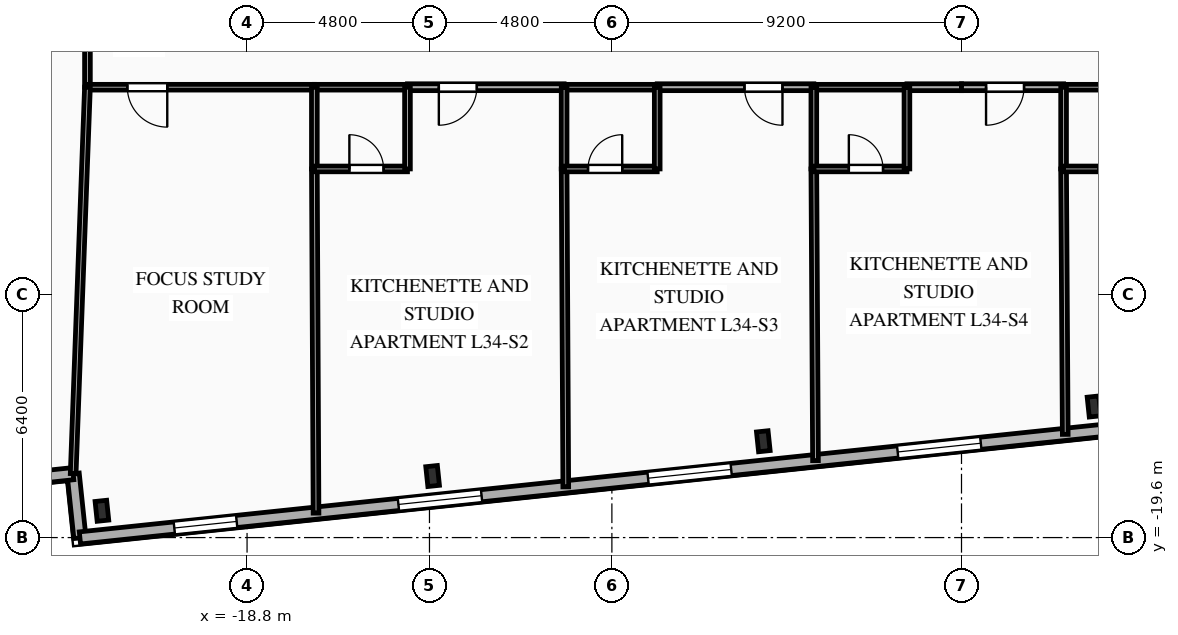
"""IFC4 building model, lengths in metres.
Left out: names, types, materials, properties, quantities, classifications, styles, units other than length and angle.
Written with IfcOpenShell. Run it as: python <this file> out.ifc"""

import sys

from ifc_helpers import new_model, si_unit, direction, frame, frame_2d, origin, origin_2d, place, context, subcontext, project, spatial, rectangle, i_section, extrude, element, fill, save


model = new_model("IFC4")
c1 = context("Model", 3, precision=1e-05, world=origin(), true_north=direction((0.0, 1.0)))
c2 = subcontext(c1, "Body", "Model", "MODEL_VIEW")
j1 = project(units=[si_unit("LENGTHUNIT", "METRE"), si_unit("PLANEANGLEUNIT", "RADIAN")], contexts=[c1])
p1 = place(None, origin())
s1 = spatial("IfcSite", under=j1, at=p1, CompositionType="ELEMENT")
p2 = place(p1, origin())
s2 = spatial("IfcBuilding", under=s1, at=p2, CompositionType="ELEMENT")
p3 = place(p2, frame((0.0, 0.0, 122.55)))
s3 = spatial("IfcBuildingStorey", under=s2, at=p3, CompositionType="ELEMENT", Elevation=122.55)
for number, where, z_axis, x_axis in (
    (1, (-22.619, -18.895, 0.0), (0.0, 0.0, 1.0), (0.995, 0.105, 0.0)),
    (2, (-13.917, -17.98, 0.0), (0.0, 0.0, 1.0), (0.995, 0.105, 0.0)),
    (3, (-5.215, -17.066, 0.0), (0.0, 0.0, 1.0), (0.995, 0.105, 0.0)),
    (4, (3.487, -16.151, 0.0), (0.0, 0.0, 1.0), (0.995, 0.105, 0.0)),
):
    element("IfcColumn", number, at=place(p3, frame(where, z_axis=z_axis, x_axis=x_axis)), inside=s3, PredefinedType="COLUMN", context=c2, shape_type="SweptSolid", body=[
        extrude(i_section(OverallWidth=0.306, OverallDepth=0.524, WebThickness=0.021, FlangeThickness=0.04, FilletRadius=0.027, at=origin_2d()), origin(), (0.0, 0.0, 1.0), 3.35),
    ])
for number, where, z_axis, x_axis in (
    (5, (-23.198, -19.609, 0.0), (0.0, 0.0, 1.0), (-0.105, 0.995, 0.0)),
    (6, (-23.376, -17.919, 0.0), (0.0, 0.0, 1.0), (-0.995, -0.105, 0.0)),
):
    element("IfcWall", number, at=place(p3, frame(where, z_axis=z_axis, x_axis=x_axis)), inside=s3, PredefinedType="SOLIDWALL", context=c2, shape_type="SweptSolid", body=[
        extrude(rectangle(XDim=1.7, YDim=0.32, at=frame_2d((0.85, 0.0))), origin(), (0.0, 0.0, 1.0), 3.0),
    ])
p4 = place(p3, frame((30.307, -13.986, 0.0), z_axis=(0.0, 0.0, 1.0), x_axis=(-0.994521628355, -0.104531003701, 0.0)))
e7 = element("IfcWall", 7, at=p4, inside=s3, PredefinedType="SOLIDWALL", context=c2, shape_type="SweptSolid", body=[
    extrude(rectangle(XDim=53.8, YDim=0.32, at=frame_2d((26.9, 0.0))), origin(), (0.0, 0.0, 1.0), 3.0),
])
p5 = place(p4, frame((3.098, 0.0, 0.85)))
e8 = element("IfcOpeningElement", 8, at=p5, cuts=e7, PredefinedType="OPENING", context=c2, shape_type="SweptSolid", body=[
    extrude(rectangle(XDim=1.65, YDim=1.85, at=frame_2d((0.825, 0.925))), frame((0.0, 0.17, 0.0), z_axis=(0.0, -1.0, 0.0), x_axis=(1.0, 0.0, 0.0)), (0.0, 0.0, 1.0), 0.34),
])
p6 = place(p4, frame((10.143, 0.0, 0.85)))
e9 = element("IfcOpeningElement", 9, at=p6, cuts=e7, PredefinedType="OPENING", context=c2, shape_type="SweptSolid", body=[
    extrude(rectangle(XDim=1.65, YDim=1.85, at=frame_2d((0.825, 0.925))), frame((0.0, 0.17, 0.0), z_axis=(0.0, -1.0, 0.0), x_axis=(1.0, 0.0, 0.0)), (0.0, 0.0, 1.0), 0.34),
])
p7 = place(p4, frame((16.753, 0.0, 0.85)))
e10 = element("IfcOpeningElement", 10, at=p7, cuts=e7, PredefinedType="OPENING", context=c2, shape_type="SweptSolid", body=[
    extrude(rectangle(XDim=2.2, YDim=1.85, at=frame_2d((1.1, 0.925))), frame((0.0, 0.17, 0.0), z_axis=(0.0, -1.0, 0.0), x_axis=(1.0, 0.0, 0.0)), (0.0, 0.0, 1.0), 0.34),
])
p8 = place(p4, frame((23.358, 0.0, 0.85)))
e11 = element("IfcOpeningElement", 11, at=p8, cuts=e7, PredefinedType="OPENING", context=c2, shape_type="SweptSolid", body=[
    extrude(rectangle(XDim=2.2, YDim=1.85, at=frame_2d((1.1, 0.925))), frame((0.0, 0.17, 0.0), z_axis=(0.0, -1.0, 0.0), x_axis=(1.0, 0.0, 0.0)), (0.0, 0.0, 1.0), 0.34),
])
p9 = place(p4, frame((29.963, 0.0, 0.85)))
e12 = element("IfcOpeningElement", 12, at=p9, cuts=e7, PredefinedType="OPENING", context=c2, shape_type="SweptSolid", body=[
    extrude(rectangle(XDim=2.2, YDim=1.85, at=frame_2d((1.1, 0.925))), frame((0.0, 0.17, 0.0), z_axis=(0.0, -1.0, 0.0), x_axis=(1.0, 0.0, 0.0)), (0.0, 0.0, 1.0), 0.34),
])
p10 = place(p4, frame((36.568, 0.0, 0.85)))
e13 = element("IfcOpeningElement", 13, at=p10, cuts=e7, PredefinedType="OPENING", context=c2, shape_type="SweptSolid", body=[
    extrude(rectangle(XDim=2.2, YDim=1.85, at=frame_2d((1.1, 0.925))), frame((0.0, 0.17, 0.0), z_axis=(0.0, -1.0, 0.0), x_axis=(1.0, 0.0, 0.0)), (0.0, 0.0, 1.0), 0.34),
])
p11 = place(p4, frame((43.173, 0.0, 0.85)))
e14 = element("IfcOpeningElement", 14, at=p11, cuts=e7, PredefinedType="OPENING", context=c2, shape_type="SweptSolid", body=[
    extrude(rectangle(XDim=2.2, YDim=1.85, at=frame_2d((1.1, 0.925))), frame((0.0, 0.17, 0.0), z_axis=(0.0, -1.0, 0.0), x_axis=(1.0, 0.0, 0.0)), (0.0, 0.0, 1.0), 0.34),
])
p12 = place(p4, frame((49.653, 0.0, 0.85)))
e15 = element("IfcOpeningElement", 15, at=p12, cuts=e7, PredefinedType="OPENING", context=c2, shape_type="SweptSolid", body=[
    extrude(rectangle(XDim=1.65, YDim=1.85, at=frame_2d((0.825, 0.925))), frame((0.0, 0.17, 0.0), z_axis=(0.0, -1.0, 0.0), x_axis=(1.0, 0.0, 0.0)), (0.0, 0.0, 1.0), 0.34),
])
p13 = place(p3, frame((-23.0, -7.75, 0.0), z_axis=(0.0, 0.0, 1.0), x_axis=(0.0, 1.0, 0.0)))
e16 = element("IfcWall", 16, at=p13, inside=s3, PredefinedType="PARTITIONING", context=c2, shape_type="SweptSolid", body=[
    extrude(rectangle(XDim=2.15, YDim=0.15, at=frame_2d((1.075, 0.0))), origin(), (0.0, 0.0, 1.0), 2.655),
])
p14 = place(p3, frame((-17.029, -7.75, 0.0), z_axis=(0.0, 0.0, 1.0), x_axis=(-1.0, 0.0, 0.0)))
e17 = element("IfcWall", 17, at=p14, inside=s3, PredefinedType="PARTITIONING", context=c2, shape_type="SweptSolid", body=[
    extrude(rectangle(XDim=5.971, YDim=0.15, at=frame_2d((2.985, 0.0))), origin(), (0.0, 0.0, 1.0), 3.0),
])
p15 = place(p14, frame((3.871, 0.0, 0.0)))
e18 = element("IfcOpeningElement", 18, at=p15, cuts=e17, PredefinedType="OPENING", context=c2, shape_type="SweptSolid", body=[
    extrude(rectangle(XDim=1.05, YDim=2.15, at=frame_2d((0.525, 1.075))), frame((0.0, 0.085, 0.0), z_axis=(0.0, -1.0, 0.0), x_axis=(1.0, 0.0, 0.0)), (0.0, 0.0, 1.0), 0.17),
])
p16 = place(p3, frame((-10.457, -7.75, 0.0), z_axis=(0.0, 0.0, 1.0), x_axis=(-1.0, 0.0, 0.0)))
e19 = element("IfcWall", 19, at=p16, inside=s3, PredefinedType="PARTITIONING", context=c2, shape_type="SweptSolid", body=[
    extrude(rectangle(XDim=4.122, YDim=0.18, at=frame_2d((2.061, 0.0))), origin(), (0.0, 0.0, 1.0), 3.0),
])
p17 = place(p16, frame((2.297, 0.0, 0.0)))
e20 = element("IfcOpeningElement", 20, at=p17, cuts=e19, PredefinedType="OPENING", context=c2, shape_type="SweptSolid", body=[
    extrude(rectangle(XDim=1.0, YDim=2.15, at=frame_2d((0.5, 1.075))), frame((0.0, 0.1, 0.0), z_axis=(0.0, -1.0, 0.0), x_axis=(1.0, 0.0, 0.0)), (0.0, 0.0, 1.0), 0.2),
])
p18 = place(p3, frame((-14.579, -7.75, 0.0), z_axis=(0.0, 0.0, 1.0), x_axis=(-1.0, 0.0, 0.0)))
e21 = element("IfcWall", 21, at=p18, inside=s3, PredefinedType="PLUMBINGWALL", context=c2, shape_type="SweptSolid", body=[
    extrude(rectangle(XDim=2.45, YDim=0.15, at=frame_2d((1.225, 0.0))), origin(), (0.0, 0.0, 1.0), 3.0),
])
p19 = place(p3, frame((-3.886, -7.75, 0.0), z_axis=(0.0, 0.0, 1.0), x_axis=(-1.0, 0.0, 0.0)))
e22 = element("IfcWall", 22, at=p19, inside=s3, PredefinedType="PARTITIONING", context=c2, shape_type="SweptSolid", body=[
    extrude(rectangle(XDim=4.121, YDim=0.18, at=frame_2d((2.061, 0.0))), origin(), (0.0, 0.0, 1.0), 3.0),
])
p20 = place(p19, frame((0.825, 0.0, 0.0)))
e23 = element("IfcOpeningElement", 23, at=p20, cuts=e22, PredefinedType="OPENING", context=c2, shape_type="SweptSolid", body=[
    extrude(rectangle(XDim=1.0, YDim=2.15, at=frame_2d((0.5, 1.075))), frame((0.0, 0.1, 0.0), z_axis=(0.0, -1.0, 0.0), x_axis=(1.0, 0.0, 0.0)), (0.0, 0.0, 1.0), 0.2),
])
p21 = place(p3, frame((-8.007, -7.75, 0.0), z_axis=(0.0, 0.0, 1.0), x_axis=(-1.0, 0.0, 0.0)))
e24 = element("IfcWall", 24, at=p21, inside=s3, PredefinedType="PLUMBINGWALL", context=c2, shape_type="SweptSolid", body=[
    extrude(rectangle(XDim=2.45, YDim=0.15, at=frame_2d((1.225, 0.0))), origin(), (0.0, 0.0, 1.0), 3.0),
])
p22 = place(p3, frame((0.0, -7.75, 0.0), z_axis=(0.0, 0.0, 1.0), x_axis=(-1.0, 0.0, 0.0)))
e25 = element("IfcWall", 25, at=p22, inside=s3, PredefinedType="PARTITIONING", context=c2, shape_type="SweptSolid", body=[
    extrude(rectangle(XDim=1.436, YDim=0.18, at=frame_2d((0.718, 0.0))), origin(), (0.0, 0.0, 1.0), 3.0),
])
p23 = place(p3, frame((-1.436, -7.75, 0.0), z_axis=(0.0, 0.0, 1.0), x_axis=(-1.0, 0.0, 0.0)))
e26 = element("IfcWall", 26, at=p23, inside=s3, PredefinedType="PLUMBINGWALL", context=c2, shape_type="SweptSolid", body=[
    extrude(rectangle(XDim=2.45, YDim=0.15, at=frame_2d((1.225, 0.0))), origin(), (0.0, 0.0, 1.0), 3.0),
])
p24 = place(p3, frame((2.686, -7.75, 0.0), z_axis=(0.0, 0.0, 1.0), x_axis=(-1.0, 0.0, 0.0)))
e27 = element("IfcWall", 27, at=p24, inside=s3, PredefinedType="PARTITIONING", context=c2, shape_type="SweptSolid", body=[
    extrude(rectangle(XDim=2.686, YDim=0.18, at=frame_2d((1.343, 0.0))), origin(), (0.0, 0.0, 1.0), 3.0),
])
p25 = place(p24, frame((1.04, 0.0, 0.0)))
e28 = element("IfcOpeningElement", 28, at=p25, cuts=e27, PredefinedType="OPENING", context=c2, shape_type="SweptSolid", body=[
    extrude(rectangle(XDim=1.0, YDim=2.15, at=frame_2d((0.5, 1.075))), frame((0.0, 0.1, 0.0), z_axis=(0.0, -1.0, 0.0), x_axis=(1.0, 0.0, 0.0)), (0.0, 0.0, 1.0), 0.2),
])
p26 = place(p3, frame((5.136, -7.75, 0.0), z_axis=(0.0, 0.0, 1.0), x_axis=(-1.0, 0.0, 0.0)))
e29 = element("IfcWall", 29, at=p26, inside=s3, PredefinedType="PLUMBINGWALL", context=c2, shape_type="SweptSolid", body=[
    extrude(rectangle(XDim=2.45, YDim=0.15, at=frame_2d((1.225, 0.0))), origin(), (0.0, 0.0, 1.0), 3.0),
])
p27 = place(p3, frame((-23.0, -7.75, 0.0), z_axis=(0.0, 0.0, 1.0), x_axis=(-0.036924695214, -0.999318050914, 0.0)))
e30 = element("IfcWall", 30, at=p27, inside=s3, PredefinedType="PARTITIONING", context=c2, shape_type="SweptSolid", body=[
    extrude(rectangle(XDim=10.176, YDim=0.15, at=frame_2d((5.088, 0.0))), origin(), (0.0, 0.0, 1.0), 3.0),
])
p28 = place(p3, frame((-17.029, -9.9, 0.0), z_axis=(0.0, 0.0, 1.0), x_axis=(0.004852348859, -0.999988227286, 0.0)))
e31 = element("IfcWall", 31, at=p28, inside=s3, PredefinedType="PARTITIONING", context=c2, shape_type="SweptSolid", body=[
    extrude(rectangle(XDim=9.056, YDim=0.15, at=frame_2d((4.528, 0.0))), origin(), (0.0, 0.0, 1.0), 3.0),
])
p29 = place(p3, frame((-17.029, -7.75, 0.0), z_axis=(0.0, 0.0, 1.0), x_axis=(0.0, -1.0, 0.0)))
e32 = element("IfcWall", 32, at=p29, inside=s3, PredefinedType="PLUMBINGWALL", context=c2, shape_type="SweptSolid", body=[
    extrude(rectangle(XDim=2.15, YDim=0.15, at=frame_2d((1.075, 0.0))), origin(), (0.0, 0.0, 1.0), 3.0),
])
p30 = place(p3, frame((-17.029, -9.9, 0.0), z_axis=(0.0, 0.0, 1.0), x_axis=(1.0, 0.0, 0.0)))
e33 = element("IfcWall", 33, at=p30, inside=s3, PredefinedType="PLUMBINGWALL", context=c2, shape_type="SweptSolid", body=[
    extrude(rectangle(XDim=2.45, YDim=0.15, at=frame_2d((1.225, 0.0))), origin(), (0.0, 0.0, 1.0), 3.0),
])
p31 = place(p30, frame((0.921, 0.0, 0.0)))
e34 = element("IfcOpeningElement", 34, at=p31, cuts=e33, PredefinedType="OPENING", context=c2, shape_type="SweptSolid", body=[
    extrude(rectangle(XDim=0.9, YDim=2.1, at=frame_2d((0.45, 1.05))), frame((0.0, 0.085, 0.0), z_axis=(0.0, -1.0, 0.0), x_axis=(1.0, 0.0, 0.0)), (0.0, 0.0, 1.0), 0.17),
])
p32 = place(p3, frame((-14.579, -9.9, 0.0), z_axis=(0.0, 0.0, 1.0), x_axis=(0.0, 1.0, 0.0)))
e35 = element("IfcWall", 35, at=p32, inside=s3, PredefinedType="PLUMBINGWALL", context=c2, shape_type="SweptSolid", body=[
    extrude(rectangle(XDim=2.15, YDim=0.15, at=frame_2d((1.075, 0.0))), origin(), (0.0, 0.0, 1.0), 3.0),
])
p33 = place(p3, frame((-10.457, -9.9, 0.0), z_axis=(0.0, 0.0, 1.0), x_axis=(0.005252948012, -0.999986203173, 0.0)))
e36 = element("IfcWall", 36, at=p33, inside=s3, PredefinedType="PARTITIONING", context=c2, shape_type="SweptSolid", body=[
    extrude(rectangle(XDim=8.366, YDim=0.15, at=frame_2d((4.183, 0.0))), origin(), (0.0, 0.0, 1.0), 3.0),
])
p34 = place(p3, frame((-10.457, -7.75, 0.0), z_axis=(0.0, 0.0, 1.0), x_axis=(0.0, -1.0, 0.0)))
e37 = element("IfcWall", 37, at=p34, inside=s3, PredefinedType="PLUMBINGWALL", context=c2, shape_type="SweptSolid", body=[
    extrude(rectangle(XDim=2.15, YDim=0.15, at=frame_2d((1.075, 0.0))), origin(), (0.0, 0.0, 1.0), 3.0),
])
p35 = place(p3, frame((-10.457, -9.9, 0.0), z_axis=(0.0, 0.0, 1.0), x_axis=(1.0, 0.0, 0.0)))
e38 = element("IfcWall", 38, at=p35, inside=s3, PredefinedType="PLUMBINGWALL", context=c2, shape_type="SweptSolid", body=[
    extrude(rectangle(XDim=2.45, YDim=0.15, at=frame_2d((1.225, 0.0))), origin(), (0.0, 0.0, 1.0), 3.0),
])
p36 = place(p35, frame((0.629, 0.0, 0.0)))
e39 = element("IfcOpeningElement", 39, at=p36, cuts=e38, PredefinedType="OPENING", context=c2, shape_type="SweptSolid", body=[
    extrude(rectangle(XDim=0.9, YDim=2.1, at=frame_2d((0.45, 1.05))), frame((0.0, 0.085, 0.0), z_axis=(0.0, -1.0, 0.0), x_axis=(1.0, 0.0, 0.0)), (0.0, 0.0, 1.0), 0.17),
])
p37 = place(p3, frame((-8.007, -9.9, 0.0), z_axis=(0.0, 0.0, 1.0), x_axis=(0.0, 1.0, 0.0)))
e40 = element("IfcWall", 40, at=p37, inside=s3, PredefinedType="PLUMBINGWALL", context=c2, shape_type="SweptSolid", body=[
    extrude(rectangle(XDim=2.15, YDim=0.15, at=frame_2d((1.075, 0.0))), origin(), (0.0, 0.0, 1.0), 3.0),
])
p38 = place(p3, frame((-3.886, -9.9, 0.0), z_axis=(0.0, 0.0, 1.0), x_axis=(0.005725643334, -0.99998360837, 0.0)))
e41 = element("IfcWall", 41, at=p38, inside=s3, PredefinedType="PARTITIONING", context=c2, shape_type="SweptSolid", body=[
    extrude(rectangle(XDim=7.675, YDim=0.15, at=frame_2d((3.838, 0.0))), origin(), (0.0, 0.0, 1.0), 3.0),
])
p39 = place(p3, frame((-3.886, -7.75, 0.0), z_axis=(0.0, 0.0, 1.0), x_axis=(0.0, -1.0, 0.0)))
e42 = element("IfcWall", 42, at=p39, inside=s3, PredefinedType="PLUMBINGWALL", context=c2, shape_type="SweptSolid", body=[
    extrude(rectangle(XDim=2.15, YDim=0.15, at=frame_2d((1.075, 0.0))), origin(), (0.0, 0.0, 1.0), 3.0),
])
p40 = place(p3, frame((-3.886, -9.9, 0.0), z_axis=(0.0, 0.0, 1.0), x_axis=(1.0, 0.0, 0.0)))
e43 = element("IfcWall", 43, at=p40, inside=s3, PredefinedType="PLUMBINGWALL", context=c2, shape_type="SweptSolid", body=[
    extrude(rectangle(XDim=2.45, YDim=0.15, at=frame_2d((1.225, 0.0))), origin(), (0.0, 0.0, 1.0), 3.0),
])
p41 = place(p40, frame((0.921, 0.0, 0.0)))
e44 = element("IfcOpeningElement", 44, at=p41, cuts=e43, PredefinedType="OPENING", context=c2, shape_type="SweptSolid", body=[
    extrude(rectangle(XDim=0.9, YDim=2.1, at=frame_2d((0.45, 1.05))), frame((0.0, 0.085, 0.0), z_axis=(0.0, -1.0, 0.0), x_axis=(1.0, 0.0, 0.0)), (0.0, 0.0, 1.0), 0.17),
])
p42 = place(p3, frame((-1.436, -9.9, 0.0), z_axis=(0.0, 0.0, 1.0), x_axis=(0.0, 1.0, 0.0)))
e45 = element("IfcWall", 45, at=p42, inside=s3, PredefinedType="PLUMBINGWALL", context=c2, shape_type="SweptSolid", body=[
    extrude(rectangle(XDim=2.15, YDim=0.15, at=frame_2d((1.075, 0.0))), origin(), (0.0, 0.0, 1.0), 3.0),
])
p43 = place(p3, frame((2.686, -9.9, 0.0), z_axis=(0.0, 0.0, 1.0), x_axis=(0.006291821768, -0.999980206294, 0.0)))
e46 = element("IfcWall", 46, at=p43, inside=s3, PredefinedType="PARTITIONING", context=c2, shape_type="SweptSolid", body=[
    extrude(rectangle(XDim=6.985, YDim=0.15, at=frame_2d((3.492, 0.0))), origin(), (0.0, 0.0, 1.0), 3.0),
])
p44 = place(p3, frame((2.686, -7.75, 0.0), z_axis=(0.0, 0.0, 1.0), x_axis=(0.0, -1.0, 0.0)))
e47 = element("IfcWall", 47, at=p44, inside=s3, PredefinedType="PLUMBINGWALL", context=c2, shape_type="SweptSolid", body=[
    extrude(rectangle(XDim=2.15, YDim=0.15, at=frame_2d((1.075, 0.0))), origin(), (0.0, 0.0, 1.0), 3.0),
])
p45 = place(p3, frame((2.686, -9.9, 0.0), z_axis=(0.0, 0.0, 1.0), x_axis=(1.0, 0.0, 0.0)))
e48 = element("IfcWall", 48, at=p45, inside=s3, PredefinedType="PLUMBINGWALL", context=c2, shape_type="SweptSolid", body=[
    extrude(rectangle(XDim=2.45, YDim=0.15, at=frame_2d((1.225, 0.0))), origin(), (0.0, 0.0, 1.0), 3.0),
])
p46 = place(p45, frame((0.921, 0.0, 0.0)))
e49 = element("IfcOpeningElement", 49, at=p46, cuts=e48, PredefinedType="OPENING", context=c2, shape_type="SweptSolid", body=[
    extrude(rectangle(XDim=0.9, YDim=2.1, at=frame_2d((0.45, 1.05))), frame((0.0, 0.085, 0.0), z_axis=(0.0, -1.0, 0.0), x_axis=(1.0, 0.0, 0.0)), (0.0, 0.0, 1.0), 0.17),
])
p47 = place(p9, origin())
e50 = element("IfcWindow", 50, at=p47, inside=s3, PartitioningType="SINGLE_PANEL", PredefinedType="WINDOW", context=c2, shape_type="SweptSolid", body=[
    extrude(rectangle(XDim=2.2, YDim=1.85, at=frame_2d((1.1, 0.925))), frame((0.0, 0.03, 0.0), z_axis=(0.0, -1.0, 0.0), x_axis=(1.0, 0.0, 0.0)), (0.0, 0.0, 1.0), 0.06),
])
fill(e12, e50)
p48 = place(p10, origin())
e51 = element("IfcWindow", 51, at=p48, inside=s3, PartitioningType="SINGLE_PANEL", PredefinedType="WINDOW", context=c2, shape_type="SweptSolid", body=[
    extrude(rectangle(XDim=2.2, YDim=1.85, at=frame_2d((1.1, 0.925))), frame((0.0, 0.03, 0.0), z_axis=(0.0, -1.0, 0.0), x_axis=(1.0, 0.0, 0.0)), (0.0, 0.0, 1.0), 0.06),
])
fill(e13, e51)
p49 = place(p11, origin())
e52 = element("IfcWindow", 52, at=p49, inside=s3, PartitioningType="SINGLE_PANEL", PredefinedType="WINDOW", context=c2, shape_type="SweptSolid", body=[
    extrude(rectangle(XDim=2.2, YDim=1.85, at=frame_2d((1.1, 0.925))), frame((0.0, 0.03, 0.0), z_axis=(0.0, -1.0, 0.0), x_axis=(1.0, 0.0, 0.0)), (0.0, 0.0, 1.0), 0.06),
])
fill(e14, e52)
p50 = place(p12, origin())
e53 = element("IfcWindow", 53, at=p50, inside=s3, PartitioningType="SINGLE_PANEL", PredefinedType="WINDOW", context=c2, shape_type="SweptSolid", body=[
    extrude(rectangle(XDim=1.65, YDim=1.85, at=frame_2d((0.825, 0.925))), frame((0.0, 0.03, 0.0), z_axis=(0.0, -1.0, 0.0), x_axis=(1.0, 0.0, 0.0)), (0.0, 0.0, 1.0), 0.06),
])
fill(e15, e53)
p51 = place(p15, origin())
e54 = element("IfcDoor", 54, at=p51, inside=s3, OperationType="SINGLE_SWING_LEFT", PredefinedType="DOOR", context=c2, shape_type="SweptSolid", body=[
    extrude(rectangle(XDim=1.05, YDim=2.15, at=frame_2d((0.525, 1.075))), frame((0.0, 0.025, 0.0), z_axis=(0.0, -1.0, 0.0), x_axis=(1.0, 0.0, 0.0)), (0.0, 0.0, 1.0), 0.05),
])
fill(e18, e54)
p52 = place(p17, origin())
e55 = element("IfcDoor", 55, at=p52, inside=s3, OperationType="SINGLE_SWING_RIGHT", PredefinedType="DOOR", context=c2, shape_type="SweptSolid", body=[
    extrude(rectangle(XDim=1.0, YDim=2.15, at=frame_2d((0.5, 1.075))), frame((0.0, 0.025, 0.0), z_axis=(0.0, -1.0, 0.0), x_axis=(1.0, 0.0, 0.0)), (0.0, 0.0, 1.0), 0.05),
])
fill(e20, e55)
p53 = place(p20, origin())
e56 = element("IfcDoor", 56, at=p53, inside=s3, OperationType="SINGLE_SWING_LEFT", PredefinedType="DOOR", context=c2, shape_type="SweptSolid", body=[
    extrude(rectangle(XDim=1.0, YDim=2.15, at=frame_2d((0.5, 1.075))), frame((0.0, 0.025, 0.0), z_axis=(0.0, -1.0, 0.0), x_axis=(1.0, 0.0, 0.0)), (0.0, 0.0, 1.0), 0.05),
])
fill(e23, e56)
p54 = place(p25, origin())
e57 = element("IfcDoor", 57, at=p54, inside=s3, OperationType="SINGLE_SWING_RIGHT", PredefinedType="DOOR", context=c2, shape_type="SweptSolid", body=[
    extrude(rectangle(XDim=1.0, YDim=2.15, at=frame_2d((0.5, 1.075))), frame((0.0, 0.025, 0.0), z_axis=(0.0, -1.0, 0.0), x_axis=(1.0, 0.0, 0.0)), (0.0, 0.0, 1.0), 0.05),
])
fill(e28, e57)
p55 = place(p31, origin())
e58 = element("IfcDoor", 58, at=p55, inside=s3, OperationType="SINGLE_SWING_LEFT", PredefinedType="DOOR", context=c2, shape_type="SweptSolid", body=[
    extrude(rectangle(XDim=0.9, YDim=2.1, at=frame_2d((0.45, 1.05))), frame((0.0, 0.025, 0.0), z_axis=(0.0, -1.0, 0.0), x_axis=(1.0, 0.0, 0.0)), (0.0, 0.0, 1.0), 0.05),
])
fill(e34, e58)
p56 = place(p36, origin())
e59 = element("IfcDoor", 59, at=p56, inside=s3, OperationType="SINGLE_SWING_RIGHT", PredefinedType="DOOR", context=c2, shape_type="SweptSolid", body=[
    extrude(rectangle(XDim=0.9, YDim=2.1, at=frame_2d((0.45, 1.05))), frame((0.0, 0.025, 0.0), z_axis=(0.0, -1.0, 0.0), x_axis=(1.0, 0.0, 0.0)), (0.0, 0.0, 1.0), 0.05),
])
fill(e39, e59)
p57 = place(p41, origin())
e60 = element("IfcDoor", 60, at=p57, inside=s3, OperationType="SINGLE_SWING_LEFT", PredefinedType="DOOR", context=c2, shape_type="SweptSolid", body=[
    extrude(rectangle(XDim=0.9, YDim=2.1, at=frame_2d((0.45, 1.05))), frame((0.0, 0.025, 0.0), z_axis=(0.0, -1.0, 0.0), x_axis=(1.0, 0.0, 0.0)), (0.0, 0.0, 1.0), 0.05),
])
fill(e44, e60)
p58 = place(p46, origin())
e61 = element("IfcDoor", 61, at=p58, inside=s3, OperationType="SINGLE_SWING_RIGHT", PredefinedType="DOOR", context=c2, shape_type="SweptSolid", body=[
    extrude(rectangle(XDim=0.9, YDim=2.1, at=frame_2d((0.45, 1.05))), frame((0.0, 0.025, 0.0), z_axis=(0.0, -1.0, 0.0), x_axis=(1.0, 0.0, 0.0)), (0.0, 0.0, 1.0), 0.05),
])
fill(e49, e61)
save(model, sys.argv[1])
